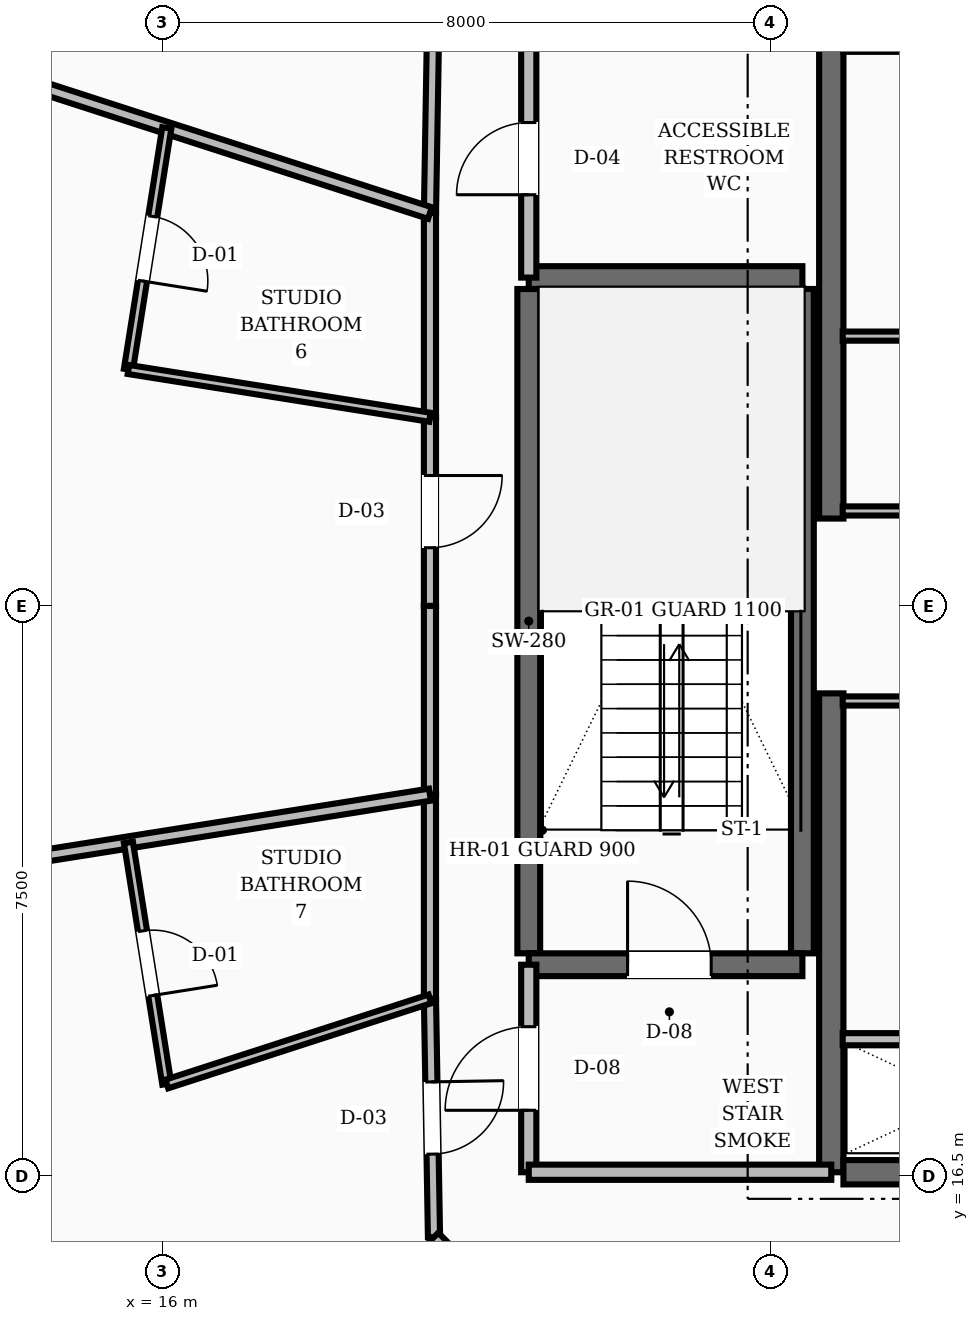
"""IFC4 building model, lengths in metres.
Left out: names, types, materials, properties, quantities, classifications, styles, units other than length and angle.
Written with IfcOpenShell. Run it as: python <this file> out.ifc"""

import sys

from ifc_helpers import new_model, si_unit, direction, frame, frame_2d, origin, place, context, subcontext, project, spatial, rectangle, extrude, element, fill, save


model = new_model("IFC4")
c1 = context("Model", 3, precision=1e-05, world=origin(), true_north=direction((0.0, 1.0)))
c2 = subcontext(c1, "Body", "Model", "MODEL_VIEW")
j1 = project(units=[si_unit("LENGTHUNIT", "METRE"), si_unit("PLANEANGLEUNIT", "RADIAN")], contexts=[c1])
p1 = place(None, origin())
s1 = spatial("IfcSite", under=j1, at=p1, CompositionType="ELEMENT")
p2 = place(p1, origin())
s2 = spatial("IfcBuilding", under=s1, at=p2, CompositionType="ELEMENT")
p3 = place(p2, frame((0.0, 0.0, 218.4)))
s3 = spatial("IfcBuildingStorey", under=s2, at=p3, CompositionType="ELEMENT", Elevation=218.4)
for number, where, z_axis, x_axis in (
    (1, (24.8, 16.55, 0.0), (0.0, 0.0, 1.0), (0.0, 1.0, 0.0)),
    (2, (24.8, 25.15, 0.0), (0.0, 0.0, 1.0), (0.0, 1.0, 0.0)),
):
    element("IfcWall", number, at=place(p3, frame(where, z_axis=z_axis, x_axis=x_axis)), inside=s3, PredefinedType="SHEAR", context=c2, shape_type="SweptSolid", body=[
        extrude(rectangle(XDim=6.3, YDim=0.32, at=frame_2d((3.15, 0.0))), origin(), (0.0, 0.0, 1.0), 3.6),
    ])
p4 = place(p3, frame((24.96, 16.55, 0.0), z_axis=(0.0, 0.0, 1.0), x_axis=(1.0, 0.0, 0.0)))
e3 = element("IfcWall", 3, at=p4, inside=s3, PredefinedType="SHEAR", context=c2, shape_type="SweptSolid", body=[
    extrude(rectangle(XDim=3.24, YDim=0.32, at=frame_2d((1.62, 0.0))), origin(), (0.0, 0.0, 1.0), 3.6),
])
for number, where, z_axis, x_axis in (
    (4, (20.82, 19.43, 0.0), (0.0, 0.0, 1.0), (0.0, 1.0, 0.0)),
    (5, (24.42, 19.43, 0.0), (0.0, 0.0, 1.0), (0.0, 1.0, 0.0)),
):
    element("IfcWall", number, at=place(p3, frame(where, z_axis=z_axis, x_axis=x_axis)), inside=s3, PredefinedType="SHEAR", context=c2, shape_type="SweptSolid", body=[
        extrude(rectangle(XDim=8.74, YDim=0.3, at=frame_2d((4.37, 0.0))), origin(), (0.0, 0.0, 1.0), 3.6),
    ])
p5 = place(p3, frame((20.82, 19.28, 0.0), z_axis=(0.0, 0.0, 1.0), x_axis=(1.0, 0.0, 0.0)))
e6 = element("IfcWall", 6, at=p5, inside=s3, PredefinedType="SHEAR", context=c2, shape_type="SweptSolid", body=[
    extrude(rectangle(XDim=3.6, YDim=0.3, at=frame_2d((1.8, 0.0))), origin(), (0.0, 0.0, 1.0), 3.6),
])
p6 = place(p5, frame((1.3, 0.0, 0.0)))
e7 = element("IfcOpeningElement", 7, at=p6, cuts=e6, PredefinedType="OPENING", context=c2, shape_type="SweptSolid", body=[
    extrude(rectangle(XDim=1.1, YDim=2.1, at=frame_2d((0.55, 1.05))), frame((0.0, 0.16, 0.0), z_axis=(0.0, -1.0, 0.0), x_axis=(1.0, 0.0, 0.0)), (0.0, 0.0, 1.0), 0.32),
])
p7 = place(p3, frame((20.82, 28.32, 0.0), z_axis=(0.0, 0.0, 1.0), x_axis=(1.0, 0.0, 0.0)))
e8 = element("IfcWall", 8, at=p7, inside=s3, PredefinedType="SHEAR", context=c2, shape_type="SweptSolid", body=[
    extrude(rectangle(XDim=3.6, YDim=0.3, at=frame_2d((1.8, 0.0))), origin(), (0.0, 0.0, 1.0), 3.6),
])
p8 = place(p3, frame((20.82, 16.55, 0.0), z_axis=(0.0, 0.0, 1.0), x_axis=(0.0, 1.0, 0.0)))
e9 = element("IfcWall", 9, at=p8, inside=s3, PredefinedType="SOLIDWALL", context=c2, shape_type="SweptSolid", body=[
    extrude(rectangle(XDim=2.73, YDim=0.2, at=frame_2d((1.365, 0.0))), origin(), (0.0, 0.0, 1.0), 2.87),
])
p9 = place(p8, frame((0.815, 0.0, 0.0)))
e10 = element("IfcOpeningElement", 10, at=p9, cuts=e9, PredefinedType="OPENING", context=c2, shape_type="SweptSolid", body=[
    extrude(rectangle(XDim=1.1, YDim=2.1, at=frame_2d((0.55, 1.05))), frame((0.0, 0.11, 0.0), z_axis=(0.0, -1.0, 0.0), x_axis=(1.0, 0.0, 0.0)), (0.0, 0.0, 1.0), 0.22),
])
p10 = place(p3, frame((20.82, 16.55, 0.0), z_axis=(0.0, 0.0, 1.0), x_axis=(1.0, 0.0, 0.0)))
e11 = element("IfcWall", 11, at=p10, inside=s3, PredefinedType="SOLIDWALL", context=c2, shape_type="SweptSolid", body=[
    extrude(rectangle(XDim=3.98, YDim=0.2, at=frame_2d((1.99, 0.0))), origin(), (0.0, 0.0, 1.0), 2.87),
])
p11 = place(p3, frame((20.82, 28.32, 0.0), z_axis=(0.0, 0.0, 1.0), x_axis=(0.0, 1.0, 0.0)))
e12 = element("IfcWall", 12, at=p11, inside=s3, PredefinedType="SOLIDWALL", context=c2, shape_type="SweptSolid", body=[
    extrude(rectangle(XDim=3.13, YDim=0.2, at=frame_2d((1.565, 0.0))), origin(), (0.0, 0.0, 1.0), 2.87),
])
p12 = place(p11, frame((1.09, 0.0, 0.0)))
e13 = element("IfcOpeningElement", 13, at=p12, cuts=e12, PredefinedType="OPENING", context=c2, shape_type="SweptSolid", body=[
    extrude(rectangle(XDim=0.95, YDim=2.1, at=frame_2d((0.475, 1.05))), frame((0.0, 0.11, 0.0), z_axis=(0.0, -1.0, 0.0), x_axis=(1.0, 0.0, 0.0)), (0.0, 0.0, 1.0), 0.22),
])
p13 = place(p3, frame((24.95, 18.3, 0.0), z_axis=(0.0, 0.0, 1.0), x_axis=(1.0, 0.0, 0.0)))
e14 = element("IfcWall", 14, at=p13, inside=s3, PredefinedType="SOLIDWALL", context=c2, shape_type="SweptSolid", body=[
    extrude(rectangle(XDim=3.2, YDim=0.16, at=frame_2d((1.6, 0.0))), origin(), (0.0, 0.0, 1.0), 2.87),
])
p14 = place(p3, frame((24.95, 25.25, 0.0), z_axis=(0.0, 0.0, 1.0), x_axis=(1.0, 0.0, 0.0)))
e15 = element("IfcWall", 15, at=p14, inside=s3, PredefinedType="PARTITIONING", context=c2, shape_type="SweptSolid", body=[
    extrude(rectangle(XDim=3.2, YDim=0.12, at=frame_2d((1.6, 0.0))), origin(), (0.0, 0.0, 1.0), 2.87),
])
p15 = place(p14, frame((1.125, 0.0, 0.0)))
e16 = element("IfcOpeningElement", 16, at=p15, cuts=e15, PredefinedType="OPENING", context=c2, shape_type="SweptSolid", body=[
    extrude(rectangle(XDim=0.95, YDim=2.1, at=frame_2d((0.475, 1.05))), frame((0.0, 0.07, 0.0), z_axis=(0.0, -1.0, 0.0), x_axis=(1.0, 0.0, 0.0)), (0.0, 0.0, 1.0), 0.14),
])
p16 = place(p3, frame((24.95, 22.75, 0.0), z_axis=(0.0, 0.0, 1.0), x_axis=(1.0, 0.0, 0.0)))
e17 = element("IfcWall", 17, at=p16, inside=s3, PredefinedType="PARTITIONING", context=c2, shape_type="SweptSolid", body=[
    extrude(rectangle(XDim=3.2, YDim=0.12, at=frame_2d((1.6, 0.0))), origin(), (0.0, 0.0, 1.0), 2.87),
])
p17 = place(p16, frame((1.125, 0.0, 0.0)))
e18 = element("IfcOpeningElement", 18, at=p17, cuts=e17, PredefinedType="OPENING", context=c2, shape_type="SweptSolid", body=[
    extrude(rectangle(XDim=0.95, YDim=2.1, at=frame_2d((0.475, 1.05))), frame((0.0, 0.07, 0.0), z_axis=(0.0, -1.0, 0.0), x_axis=(1.0, 0.0, 0.0)), (0.0, 0.0, 1.0), 0.14),
])
p18 = place(p3, frame((24.95, 27.55, 0.0), z_axis=(0.0, 0.0, 1.0), x_axis=(1.0, 0.0, 0.0)))
e19 = element("IfcWall", 19, at=p18, inside=s3, PredefinedType="PARTITIONING", context=c2, shape_type="SweptSolid", body=[
    extrude(rectangle(XDim=3.2, YDim=0.12, at=frame_2d((1.6, 0.0))), origin(), (0.0, 0.0, 1.0), 2.87),
])
p19 = place(p18, frame((1.125, 0.0, 0.0)))
e20 = element("IfcOpeningElement", 20, at=p19, cuts=e19, PredefinedType="OPENING", context=c2, shape_type="SweptSolid", body=[
    extrude(rectangle(XDim=0.95, YDim=2.1, at=frame_2d((0.475, 1.05))), frame((0.0, 0.07, 0.0), z_axis=(0.0, -1.0, 0.0), x_axis=(1.0, 0.0, 0.0)), (0.0, 0.0, 1.0), 0.14),
])
p20 = place(p3, frame((19.573, 32.303, 0.0), z_axis=(0.0, 0.0, 1.0), x_axis=(-0.016981035134, -0.999855811828, 0.0)))
e21 = element("IfcWall", 21, at=p20, inside=s3, PredefinedType="SOLIDWALL", context=c2, shape_type="SweptSolid", body=[
    extrude(rectangle(XDim=3.134, YDim=0.16, at=frame_2d((1.567, 0.0))), origin(), (0.0, 0.0, 1.0), 2.87),
])
p21 = place(p3, frame((19.52, 29.169, 0.0), z_axis=(0.0, 0.0, 1.0), x_axis=(0.0, -1.0, 0.0)))
e22 = element("IfcWall", 22, at=p21, inside=s3, PredefinedType="SOLIDWALL", context=c2, shape_type="SweptSolid", body=[
    extrude(rectangle(XDim=2.687, YDim=0.16, at=frame_2d((1.344, 0.0))), origin(), (0.0, 0.0, 1.0), 2.87),
])
p22 = place(p3, frame((19.52, 26.482, 0.0), z_axis=(0.0, 0.0, 1.0), x_axis=(0.0, -1.0, 0.0)))
e23 = element("IfcWall", 23, at=p22, inside=s3, PredefinedType="SOLIDWALL", context=c2, shape_type="SweptSolid", body=[
    extrude(rectangle(XDim=2.482, YDim=0.16, at=frame_2d((1.241, 0.0))), origin(), (0.0, 0.0, 1.0), 2.87),
])
p23 = place(p22, frame((0.766, 0.0, 0.0)))
e24 = element("IfcOpeningElement", 24, at=p23, cuts=e23, PredefinedType="OPENING", context=c2, shape_type="SweptSolid", body=[
    extrude(rectangle(XDim=0.95, YDim=2.1, at=frame_2d((0.475, 1.05))), frame((0.0, 0.09, 0.0), z_axis=(0.0, -1.0, 0.0), x_axis=(1.0, 0.0, 0.0)), (0.0, 0.0, 1.0), 0.18),
])
p24 = place(p3, frame((19.52, 24.0, 0.0), z_axis=(0.0, 0.0, 1.0), x_axis=(0.0, -1.0, 0.0)))
e25 = element("IfcWall", 25, at=p24, inside=s3, PredefinedType="SOLIDWALL", context=c2, shape_type="SweptSolid", body=[
    extrude(rectangle(XDim=2.482, YDim=0.16, at=frame_2d((1.241, 0.0))), origin(), (0.0, 0.0, 1.0), 2.87),
])
p25 = place(p3, frame((19.52, 21.518, 0.0), z_axis=(0.0, 0.0, 1.0), x_axis=(0.0, -1.0, 0.0)))
e26 = element("IfcWall", 26, at=p25, inside=s3, PredefinedType="SOLIDWALL", context=c2, shape_type="SweptSolid", body=[
    extrude(rectangle(XDim=2.687, YDim=0.16, at=frame_2d((1.344, 0.0))), origin(), (0.0, 0.0, 1.0), 2.87),
])
p26 = place(p3, frame((19.52, 18.831, 0.0), z_axis=(0.0, 0.0, 1.0), x_axis=(0.016981035134, -0.999855811828, 0.0)))
e27 = element("IfcWall", 27, at=p26, inside=s3, PredefinedType="SOLIDWALL", context=c2, shape_type="SweptSolid", body=[
    extrude(rectangle(XDim=3.134, YDim=0.16, at=frame_2d((1.567, 0.0))), origin(), (0.0, 0.0, 1.0), 2.87),
])
p27 = place(p26, frame((1.092, 0.0, 0.0)))
e28 = element("IfcOpeningElement", 28, at=p27, cuts=e27, PredefinedType="OPENING", context=c2, shape_type="SweptSolid", body=[
    extrude(rectangle(XDim=0.95, YDim=2.1, at=frame_2d((0.475, 1.05))), frame((0.0, 0.09, 0.0), z_axis=(0.0, -1.0, 0.0), x_axis=(1.0, 0.0, 0.0)), (0.0, 0.0, 1.0), 0.18),
])
p28 = place(p3, frame((19.573, 15.697, 0.0), z_axis=(0.0, 0.0, 1.0), x_axis=(0.707106781187, -0.707106781187, 0.0)))
e29 = element("IfcWall", 29, at=p28, inside=s3, PredefinedType="SOLIDWALL", context=c2, shape_type="SweptSolid", body=[
    extrude(rectangle(XDim=2.916, YDim=0.16, at=frame_2d((1.458, 0.0))), origin(), (0.0, 0.0, 1.0), 2.87),
])
p29 = place(p3, frame((19.52, 29.169, 0.0), z_axis=(0.0, 0.0, 1.0), x_axis=(-0.951482710275, 0.307702213264, 0.0)))
e30 = element("IfcWall", 30, at=p29, inside=s3, PredefinedType="SOLIDWALL", context=c2, shape_type="SweptSolid", body=[
    extrude(rectangle(XDim=9.524, YDim=0.16, at=frame_2d((4.762, 0.0))), origin(), (0.0, 0.0, 1.0), 2.87),
])
p30 = place(p3, frame((16.058, 30.289, 0.0), z_axis=(0.0, 0.0, 1.0), x_axis=(-0.156987224251, -0.987600633567, 0.0)))
e31 = element("IfcWall", 31, at=p30, inside=s3, PredefinedType="PARTITIONING", context=c2, shape_type="SweptSolid", body=[
    extrude(rectangle(XDim=3.218, YDim=0.12, at=frame_2d((1.609, 0.0))), origin(), (0.0, 0.0, 1.0), 2.87),
])
p31 = place(p30, frame((1.179, 0.0, 0.0)))
e32 = element("IfcOpeningElement", 32, at=p31, cuts=e31, PredefinedType="OPENING", context=c2, shape_type="SweptSolid", body=[
    extrude(rectangle(XDim=0.86, YDim=2.1, at=frame_2d((0.43, 1.05))), frame((0.0, 0.07, 0.0), z_axis=(0.0, -1.0, 0.0), x_axis=(1.0, 0.0, 0.0)), (0.0, 0.0, 1.0), 0.14),
])
p32 = place(p3, frame((19.52, 26.482, 0.0), z_axis=(0.0, 0.0, 1.0), x_axis=(-0.987675083343, 0.156518145093, 0.0)))
e33 = element("IfcWall", 33, at=p32, inside=s3, PredefinedType="PARTITIONING", context=c2, shape_type="SweptSolid", body=[
    extrude(rectangle(XDim=4.017, YDim=0.12, at=frame_2d((2.008, 0.0))), origin(), (0.0, 0.0, 1.0), 2.87),
])
p33 = place(p3, frame((19.52, 21.518, 0.0), z_axis=(0.0, 0.0, 1.0), x_axis=(-0.987669269577, -0.156554827241, 0.0)))
e34 = element("IfcWall", 34, at=p33, inside=s3, PredefinedType="SOLIDWALL", context=c2, shape_type="SweptSolid", body=[
    extrude(rectangle(XDim=10.52, YDim=0.16, at=frame_2d((5.26, 0.0))), origin(), (0.0, 0.0, 1.0), 2.87),
])
p34 = place(p3, frame((15.553, 20.889, 0.0), z_axis=(0.0, 0.0, 1.0), x_axis=(0.156987224251, -0.987600633567, 0.0)))
e35 = element("IfcWall", 35, at=p34, inside=s3, PredefinedType="PARTITIONING", context=c2, shape_type="SweptSolid", body=[
    extrude(rectangle(XDim=3.218, YDim=0.12, at=frame_2d((1.609, 0.0))), origin(), (0.0, 0.0, 1.0), 2.87),
])
p35 = place(p34, frame((1.179, 0.0, 0.0)))
e36 = element("IfcOpeningElement", 36, at=p35, cuts=e35, PredefinedType="OPENING", context=c2, shape_type="SweptSolid", body=[
    extrude(rectangle(XDim=0.86, YDim=2.1, at=frame_2d((0.43, 1.05))), frame((0.0, 0.07, 0.0), z_axis=(0.0, -1.0, 0.0), x_axis=(1.0, 0.0, 0.0)), (0.0, 0.0, 1.0), 0.14),
])
p36 = place(p3, frame((19.52, 18.831, 0.0), z_axis=(0.0, 0.0, 1.0), x_axis=(-0.951496525558, -0.307659490105, 0.0)))
e37 = element("IfcWall", 37, at=p36, inside=s3, PredefinedType="PARTITIONING", context=c2, shape_type="SweptSolid", body=[
    extrude(rectangle(XDim=3.638, YDim=0.12, at=frame_2d((1.819, 0.0))), origin(), (0.0, 0.0, 1.0), 2.87),
])
p37 = place(p6, origin())
e38 = element("IfcDoor", 38, at=p37, inside=s3, OperationType="SINGLE_SWING_LEFT", PredefinedType="DOOR", context=c2, shape_type="SweptSolid", body=[
    extrude(rectangle(XDim=1.1, YDim=2.1, at=frame_2d((0.55, 1.05))), frame((0.0, 0.025, 0.0), z_axis=(0.0, -1.0, 0.0), x_axis=(1.0, 0.0, 0.0)), (0.0, 0.0, 1.0), 0.05),
])
fill(e7, e38)
p38 = place(p9, origin())
e39 = element("IfcDoor", 39, at=p38, inside=s3, OperationType="SINGLE_SWING_LEFT", PredefinedType="DOOR", context=c2, shape_type="SweptSolid", body=[
    extrude(rectangle(XDim=1.1, YDim=2.1, at=frame_2d((0.55, 1.05))), frame((0.0, 0.025, 0.0), z_axis=(0.0, -1.0, 0.0), x_axis=(1.0, 0.0, 0.0)), (0.0, 0.0, 1.0), 0.05),
])
fill(e10, e39)
p39 = place(p12, origin())
e40 = element("IfcDoor", 40, at=p39, inside=s3, OperationType="SINGLE_SWING_LEFT", PredefinedType="DOOR", context=c2, shape_type="SweptSolid", body=[
    extrude(rectangle(XDim=0.95, YDim=2.1, at=frame_2d((0.475, 1.05))), frame((0.0, 0.025, 0.0), z_axis=(0.0, -1.0, 0.0), x_axis=(1.0, 0.0, 0.0)), (0.0, 0.0, 1.0), 0.05),
])
fill(e13, e40)
p40 = place(p31, origin())
e41 = element("IfcDoor", 41, at=p40, inside=s3, OperationType="SINGLE_SWING_RIGHT", PredefinedType="DOOR", context=c2, shape_type="SweptSolid", body=[
    extrude(rectangle(XDim=0.86, YDim=2.1, at=frame_2d((0.43, 1.05))), frame((0.0, 0.025, 0.0), z_axis=(0.0, -1.0, 0.0), x_axis=(1.0, 0.0, 0.0)), (0.0, 0.0, 1.0), 0.05),
])
fill(e32, e41)
p41 = place(p23, origin())
e42 = element("IfcDoor", 42, at=p41, inside=s3, OperationType="SINGLE_SWING_LEFT", PredefinedType="DOOR", context=c2, shape_type="SweptSolid", body=[
    extrude(rectangle(XDim=0.95, YDim=2.1, at=frame_2d((0.475, 1.05))), frame((0.0, 0.025, 0.0), z_axis=(0.0, -1.0, 0.0), x_axis=(1.0, 0.0, 0.0)), (0.0, 0.0, 1.0), 0.05),
])
fill(e24, e42)
p42 = place(p35, origin())
e43 = element("IfcDoor", 43, at=p42, inside=s3, OperationType="SINGLE_SWING_RIGHT", PredefinedType="DOOR", context=c2, shape_type="SweptSolid", body=[
    extrude(rectangle(XDim=0.86, YDim=2.1, at=frame_2d((0.43, 1.05))), frame((0.0, 0.025, 0.0), z_axis=(0.0, -1.0, 0.0), x_axis=(1.0, 0.0, 0.0)), (0.0, 0.0, 1.0), 0.05),
])
fill(e36, e43)
p43 = place(p27, origin())
e44 = element("IfcDoor", 44, at=p43, inside=s3, OperationType="SINGLE_SWING_LEFT", PredefinedType="DOOR", context=c2, shape_type="SweptSolid", body=[
    extrude(rectangle(XDim=0.95, YDim=2.1, at=frame_2d((0.475, 1.05))), frame((0.0, 0.025, 0.0), z_axis=(0.0, -1.0, 0.0), x_axis=(1.0, 0.0, 0.0)), (0.0, 0.0, 1.0), 0.05),
])
fill(e28, e44)
save(model, sys.argv[1])
